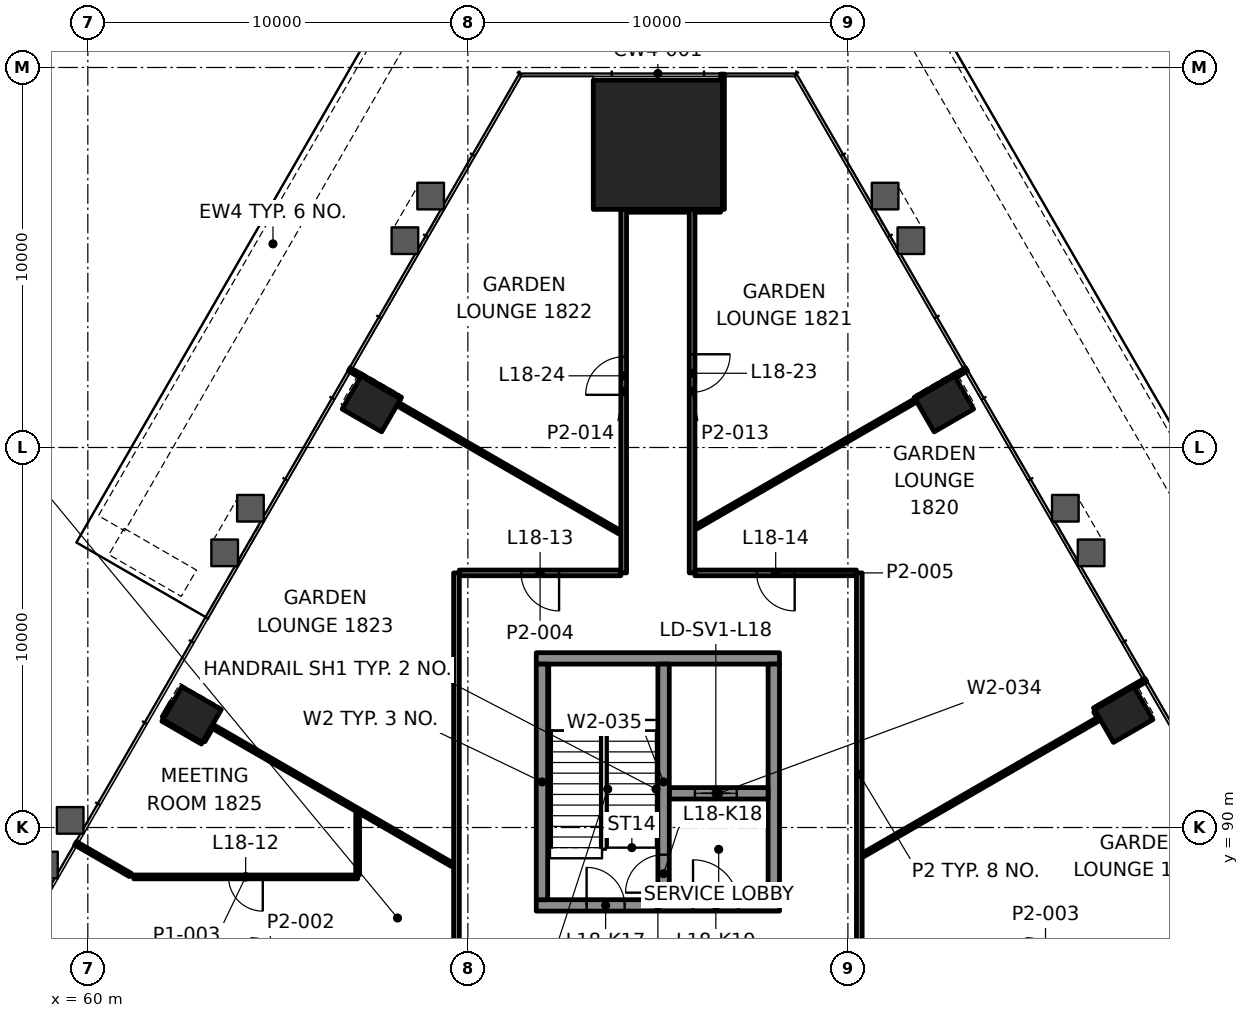
"""IFC4 building model, lengths in metres.
Left out: names, types, materials, properties, quantities, classifications, styles, units other than length and angle.
Written with IfcOpenShell. Run it as: python <this file> out.ifc"""

import sys

from ifc_helpers import new_model, si_unit, direction, frame, frame_2d, origin, origin_2d, place, context, subcontext, project, spatial, rectangle, extrude, element, fill, save


model = new_model("IFC4")
c1 = context("Model", 3, precision=1e-05, world=origin(), true_north=direction((0.0, 1.0)))
c2 = subcontext(c1, "Body", "Model", "MODEL_VIEW")
j1 = project(units=[si_unit("LENGTHUNIT", "METRE"), si_unit("PLANEANGLEUNIT", "RADIAN")], contexts=[c1])
p1 = place(None, origin())
s1 = spatial("IfcSite", under=j1, at=p1, CompositionType="ELEMENT")
p2 = place(p1, origin())
s2 = spatial("IfcBuilding", under=s1, at=p2, CompositionType="ELEMENT")
p3 = place(p2, frame((0.0, 0.0, 82.0)))
s3 = spatial("IfcBuildingStorey", under=s2, at=p3, CompositionType="ELEMENT", Elevation=82.0)
p4 = place(p3, frame((75.0, 107.966, 0.0), z_axis=(0.0, 0.0, 1.0), x_axis=(-1.0, 0.0, 0.0)))
e1 = element("IfcColumn", 1, at=p4, inside=s3, PredefinedType="COLUMN", context=c2, shape_type="SweptSolid", body=[
    extrude(rectangle(XDim=3.4, YDim=3.4, at=origin_2d()), origin(), (0.0, 0.0, 1.0), 4.2),
])
for number, where, z_axis, x_axis in (
    (2, (87.257, 92.972, -0.0), (0.0, 0.0, 1.0), (-0.5, 0.866, 0.0)),
    (3, (82.539, 101.144, -0.0), (0.0, 0.0, 1.0), (-0.5, 0.866, 0.0)),
    (4, (67.461, 101.144, -0.0), (0.0, 0.0, 1.0), (-0.5, -0.866, 0.0)),
    (5, (62.743, 92.972, -0.0), (0.0, 0.0, 1.0), (-0.5, -0.866, 0.0)),
):
    element("IfcColumn", number, at=place(p3, frame(where, z_axis=z_axis, x_axis=x_axis)), inside=s3, PredefinedType="COLUMN", context=c2, shape_type="SweptSolid", body=[
        extrude(rectangle(XDim=1.0, YDim=1.2, at=origin_2d()), origin(), (0.0, 0.0, 1.0), 4.2),
    ])
p5 = place(p3, frame((71.8, 87.95, 0.0), z_axis=(0.0, 0.0, 1.0), x_axis=(1.0, 0.0, 0.0)))
e6 = element("IfcWall", 6, at=p5, inside=s3, PredefinedType="SHEAR", context=c2, shape_type="SweptSolid", body=[
    extrude(rectangle(XDim=6.4, YDim=0.3, at=frame_2d((3.2, 0.0))), origin(), (0.0, 0.0, 1.0), 4.0),
])
p6 = place(p5, frame((1.325, 0.0, 0.0)))
e7 = element("IfcOpeningElement", 7, at=p6, cuts=e6, PredefinedType="OPENING", context=c2, shape_type="SweptSolid", body=[
    extrude(rectangle(XDim=1.0, YDim=2.1, at=frame_2d((0.5, 1.05))), frame((0.0, 0.16, 0.0), z_axis=(0.0, -1.0, 0.0), x_axis=(1.0, 0.0, 0.0)), (0.0, 0.0, 1.0), 0.32),
])
p7 = place(p5, frame((4.125, 0.0, 0.0)))
e8 = element("IfcOpeningElement", 8, at=p7, cuts=e6, PredefinedType="OPENING", context=c2, shape_type="SweptSolid", body=[
    extrude(rectangle(XDim=1.2, YDim=2.1, at=frame_2d((0.6, 1.05))), frame((0.0, 0.16, 0.0), z_axis=(0.0, -1.0, 0.0), x_axis=(1.0, 0.0, 0.0)), (0.0, 0.0, 1.0), 0.32),
])
p8 = place(p3, frame((71.8, 94.45, 0.0), z_axis=(0.0, 0.0, 1.0), x_axis=(1.0, 0.0, 0.0)))
e9 = element("IfcWall", 9, at=p8, inside=s3, PredefinedType="SHEAR", context=c2, shape_type="SweptSolid", body=[
    extrude(rectangle(XDim=6.4, YDim=0.3, at=frame_2d((3.2, 0.0))), origin(), (0.0, 0.0, 1.0), 4.0),
])
for number, where, z_axis, x_axis in (
    (10, (71.95, 88.1, 0.0), (0.0, 0.0, 1.0), (0.0, 1.0, 0.0)),
    (11, (78.05, 88.1, 0.0), (0.0, 0.0, 1.0), (0.0, 1.0, 0.0)),
):
    element("IfcWall", number, at=place(p3, frame(where, z_axis=z_axis, x_axis=x_axis)), inside=s3, PredefinedType="SHEAR", context=c2, shape_type="SweptSolid", body=[
        extrude(rectangle(XDim=6.2, YDim=0.3, at=frame_2d((3.1, 0.0))), origin(), (0.0, 0.0, 1.0), 4.0),
    ])
p9 = place(p3, frame((75.3, 90.9, 0.0), z_axis=(0.0, 0.0, 1.0), x_axis=(1.0, 0.0, 0.0)))
e12 = element("IfcWall", 12, at=p9, inside=s3, PredefinedType="SHEAR", context=c2, shape_type="SweptSolid", body=[
    extrude(rectangle(XDim=2.6, YDim=0.3, at=frame_2d((1.3, 0.0))), origin(), (0.0, 0.0, 1.0), 4.0),
])
p10 = place(p9, frame((0.675, 0.0, 0.0)))
e13 = element("IfcOpeningElement", 13, at=p10, cuts=e12, PredefinedType="OPENING", context=c2, shape_type="SweptSolid", body=[
    extrude(rectangle(XDim=1.1, YDim=2.1, at=frame_2d((0.55, 1.05))), frame((0.0, 0.16, 0.0), z_axis=(0.0, -1.0, 0.0), x_axis=(1.0, 0.0, 0.0)), (0.0, 0.0, 1.0), 0.32),
])
p11 = place(p3, frame((75.15, 88.1, 0.0), z_axis=(0.0, 0.0, 1.0), x_axis=(0.0, 1.0, 0.0)))
e14 = element("IfcWall", 14, at=p11, inside=s3, PredefinedType="SHEAR", context=c2, shape_type="SweptSolid", body=[
    extrude(rectangle(XDim=6.2, YDim=0.3, at=frame_2d((3.1, 0.0))), origin(), (0.0, 0.0, 1.0), 4.0),
])
p12 = place(p11, frame((0.185, 0.0, 0.0)))
e15 = element("IfcOpeningElement", 15, at=p12, cuts=e14, PredefinedType="OPENING", context=c2, shape_type="SweptSolid", body=[
    extrude(rectangle(XDim=1.0, YDim=2.1, at=frame_2d((0.5, 1.05))), frame((0.0, 0.16, 0.0), z_axis=(0.0, -1.0, 0.0), x_axis=(1.0, 0.0, 0.0)), (0.0, 0.0, 1.0), 0.32),
])
p13 = place(p3, frame((67.1, 88.7, 0.0), z_axis=(0.0, 0.0, 1.0), x_axis=(-1.0, 0.0, 0.0)))
e16 = element("IfcWall", 16, at=p13, inside=s3, PredefinedType="PARTITIONING", context=c2, shape_type="SweptSolid", body=[
    extrude(rectangle(XDim=5.893, YDim=0.1, at=frame_2d((2.947, 0.0))), origin(), (0.0, 0.0, 1.0), 3.4),
])
p14 = place(p13, frame((2.497, 0.0, 0.0)))
e17 = element("IfcOpeningElement", 17, at=p14, cuts=e16, PredefinedType="OPENING", context=c2, shape_type="SweptSolid", body=[
    extrude(rectangle(XDim=0.9, YDim=2.1, at=frame_2d((0.45, 1.05))), frame((0.0, 0.06, 0.0), z_axis=(0.0, -1.0, 0.0), x_axis=(1.0, 0.0, 0.0)), (0.0, 0.0, 1.0), 0.12),
])
p15 = place(p3, frame((74.025, 96.7, 0.0), z_axis=(0.0, 0.0, 1.0), x_axis=(-1.0, 0.0, 0.0)))
e18 = element("IfcWall", 18, at=p15, inside=s3, PredefinedType="PARTITIONING", context=c2, shape_type="SweptSolid", body=[
    extrude(rectangle(XDim=4.25, YDim=0.15, at=frame_2d((2.125, 0.0))), origin(), (0.0, 0.0, 1.0), 3.4),
])
p16 = place(p15, frame((1.625, 0.0, 0.0)))
e19 = element("IfcOpeningElement", 19, at=p16, cuts=e18, PredefinedType="OPENING", context=c2, shape_type="SweptSolid", body=[
    extrude(rectangle(XDim=1.0, YDim=2.1, at=frame_2d((0.5, 1.05))), frame((0.0, 0.085, 0.0), z_axis=(0.0, -1.0, 0.0), x_axis=(1.0, 0.0, 0.0)), (0.0, 0.0, 1.0), 0.17),
])
p17 = place(p3, frame((80.225, 96.7, 0.0), z_axis=(0.0, 0.0, 1.0), x_axis=(-1.0, 0.0, 0.0)))
e20 = element("IfcWall", 20, at=p17, inside=s3, PredefinedType="PARTITIONING", context=c2, shape_type="SweptSolid", body=[
    extrude(rectangle(XDim=4.25, YDim=0.15, at=frame_2d((2.125, 0.0))), origin(), (0.0, 0.0, 1.0), 3.4),
])
p18 = place(p17, frame((1.625, 0.0, 0.0)))
e21 = element("IfcOpeningElement", 21, at=p18, cuts=e20, PredefinedType="OPENING", context=c2, shape_type="SweptSolid", body=[
    extrude(rectangle(XDim=1.0, YDim=2.1, at=frame_2d((0.5, 1.05))), frame((0.0, 0.085, 0.0), z_axis=(0.0, -1.0, 0.0), x_axis=(1.0, 0.0, 0.0)), (0.0, 0.0, 1.0), 0.17),
])
p19 = place(p3, frame((74.176, 106.266, 0.0), z_axis=(0.0, 0.0, 1.0), x_axis=(1.0, 0.0, 0.0)))
e22 = element("IfcWall", 22, at=p19, inside=s3, PredefinedType="PARTITIONING", context=c2, shape_type="SweptSolid", body=[
    extrude(rectangle(XDim=1.649, YDim=0.15, at=frame_2d((0.825, 0.0))), origin(), (0.0, 0.0, 1.0), 3.397),
])
p20 = place(p3, frame((80.401, 89.28, 0.0), z_axis=(0.0, 0.0, 1.0), x_axis=(0.866017489163, 0.500013708276, 0.0)))
e23 = element("IfcWall", 23, at=p20, inside=s3, PredefinedType="PARTITIONING", context=c2, shape_type="SweptSolid", body=[
    extrude(rectangle(XDim=7.183, YDim=0.1, at=frame_2d((3.592, 0.0))), origin(), (0.0, 0.0, 1.0), 3.4),
])
p21 = place(p3, frame((86.488, 93.105, 0.0), z_axis=(0.0, 0.0, 1.0), x_axis=(0.866018739521, 0.500011542666, 0.0)))
e24 = element("IfcWall", 24, at=p21, inside=s3, PredefinedType="PARTITIONING", context=c2, shape_type="SweptSolid", body=[
    extrude(rectangle(XDim=1.56, YDim=0.1, at=frame_2d((0.78, 0.0))), origin(), (0.0, 0.0, 1.0), 3.165),
])
p22 = place(p3, frame((76.001, 97.901, 0.0), z_axis=(0.0, 0.0, 1.0), x_axis=(0.866029244915, 0.499993346908, 0.0)))
e25 = element("IfcWall", 25, at=p22, inside=s3, PredefinedType="PARTITIONING", context=c2, shape_type="SweptSolid", body=[
    extrude(rectangle(XDim=6.683, YDim=0.1, at=frame_2d((3.342, 0.0))), origin(), (0.0, 0.0, 1.0), 3.4),
])
p23 = place(p3, frame((81.769, 101.277, 0.0), z_axis=(0.0, 0.0, 1.0), x_axis=(0.866029224906, 0.499993381564, 0.0)))
e26 = element("IfcWall", 26, at=p23, inside=s3, PredefinedType="PARTITIONING", context=c2, shape_type="SweptSolid", body=[
    extrude(rectangle(XDim=1.56, YDim=0.1, at=frame_2d((0.78, 0.0))), origin(), (0.0, 0.0, 1.0), 3.4),
])
p24 = place(p3, frame((63.038, 92.283, 0.0), z_axis=(0.0, 0.0, 1.0), x_axis=(0.500246304613, 0.865883153041, 0.0)))
e27 = element("IfcWall", 27, at=p24, inside=s3, PredefinedType="PARTITIONING", context=c2, shape_type="SweptSolid", body=[
    extrude(rectangle(XDim=0.39, YDim=0.1, at=frame_2d((0.195, 0.0))), origin(), (0.0, 0.0, 1.0), 3.322),
])
p25 = place(p3, frame((62.002, 92.889, 0.0), z_axis=(0.0, 0.0, 1.0), x_axis=(0.4997542532, 0.866167239284, 0.0)))
e28 = element("IfcWall", 28, at=p25, inside=s3, PredefinedType="PARTITIONING", context=c2, shape_type="SweptSolid", body=[
    extrude(rectangle(XDim=0.443, YDim=0.1, at=frame_2d((0.222, 0.0))), origin(), (0.0, 0.0, 1.0), 3.322),
])
p26 = place(p3, frame((80.3, 86.1, 0.0), z_axis=(0.0, 0.0, 1.0), x_axis=(0.0, 1.0, 0.0)))
e29 = element("IfcWall", 29, at=p26, inside=s3, PredefinedType="PARTITIONING", context=c2, shape_type="SweptSolid", body=[
    extrude(rectangle(XDim=10.599, YDim=0.15, at=frame_2d((5.3, 0.0))), origin(), (0.0, 0.0, 1.0), 3.322),
])
p27 = place(p3, frame((76.7, 106.267, 0.0), z_axis=(0.0, 0.0, 1.0), x_axis=(0.0, 1.0, 0.0)))
e30 = element("IfcWall", 30, at=p27, inside=s3, PredefinedType="PARTITIONING", context=c2, shape_type="SweptSolid", body=[
    extrude(rectangle(XDim=3.56, YDim=0.1, at=frame_2d((1.78, 0.0))), origin(), (0.0, 0.0, 1.0), 3.4),
])
p28 = place(p3, frame((75.9, 106.266, 0.0), z_axis=(0.0, 0.0, 1.0), x_axis=(0.0, -1.0, 0.0)))
e31 = element("IfcWall", 31, at=p28, inside=s3, PredefinedType="PARTITIONING", context=c2, shape_type="SweptSolid", body=[
    extrude(rectangle(XDim=9.566, YDim=0.15, at=frame_2d((4.783, 0.0))), origin(), (0.0, 0.0, 1.0), 3.4),
])
p29 = place(p28, frame((3.813, 0.0, 0.0)))
e32 = element("IfcOpeningElement", 32, at=p29, cuts=e31, PredefinedType="OPENING", context=c2, shape_type="SweptSolid", body=[
    extrude(rectangle(XDim=1.0, YDim=2.1, at=frame_2d((0.5, 1.05))), frame((0.0, 0.085, 0.0), z_axis=(0.0, -1.0, 0.0), x_axis=(1.0, 0.0, 0.0)), (0.0, 0.0, 1.0), 0.17),
])
p30 = place(p3, frame((74.1, 96.7, 0.0), z_axis=(0.0, 0.0, 1.0), x_axis=(0.0, 1.0, 0.0)))
e33 = element("IfcWall", 33, at=p30, inside=s3, PredefinedType="PARTITIONING", context=c2, shape_type="SweptSolid", body=[
    extrude(rectangle(XDim=9.566, YDim=0.15, at=frame_2d((4.783, 0.0))), origin(), (0.0, 0.0, 1.0), 3.4),
])
p31 = place(p30, frame((4.686, 0.0, 0.0)))
e34 = element("IfcOpeningElement", 34, at=p31, cuts=e33, PredefinedType="OPENING", context=c2, shape_type="SweptSolid", body=[
    extrude(rectangle(XDim=1.0, YDim=2.1, at=frame_2d((0.5, 1.05))), frame((0.0, 0.085, 0.0), z_axis=(0.0, -1.0, 0.0), x_axis=(1.0, 0.0, 0.0)), (0.0, 0.0, 1.0), 0.17),
])
p32 = place(p3, frame((69.7, 86.1, 0.0), z_axis=(0.0, 0.0, 1.0), x_axis=(0.0, 1.0, 0.0)))
e35 = element("IfcWall", 35, at=p32, inside=s3, PredefinedType="PARTITIONING", context=c2, shape_type="SweptSolid", body=[
    extrude(rectangle(XDim=10.599, YDim=0.15, at=frame_2d((5.3, 0.0))), origin(), (0.0, 0.0, 1.0), 3.322),
])
p33 = place(p3, frame((67.1, 88.75, 0.0), z_axis=(0.0, 0.0, 1.0), x_axis=(0.0, 1.0, 0.0)))
e36 = element("IfcWall", 36, at=p33, inside=s3, PredefinedType="PARTITIONING", context=c2, shape_type="SweptSolid", body=[
    extrude(rectangle(XDim=1.619, YDim=0.1, at=frame_2d((0.81, 0.0))), origin(), (0.0, 0.0, 1.0), 3.322),
])
p34 = place(p3, frame((86.597, 92.915, 0.0), z_axis=(0.0, 0.0, 1.0), x_axis=(-0.500013496215, 0.866017611601, 0.0)))
e37 = element("IfcWall", 37, at=p34, inside=s3, PredefinedType="PARTITIONING", context=c2, shape_type="SweptSolid", body=[
    extrude(rectangle(XDim=0.169, YDim=0.1, at=frame_2d((0.085, 0.0))), origin(), (0.0, 0.0, 1.0), 3.4),
])
p35 = place(p3, frame((68.23, 101.277, 0.0), z_axis=(0.0, 0.0, 1.0), x_axis=(-0.866018739521, 0.500011542666, 0.0)))
e38 = element("IfcWall", 38, at=p35, inside=s3, PredefinedType="PARTITIONING", context=c2, shape_type="SweptSolid", body=[
    extrude(rectangle(XDim=1.56, YDim=0.1, at=frame_2d((0.78, 0.0))), origin(), (0.0, 0.0, 1.0), 3.4),
])
p36 = place(p3, frame((73.999, 97.768, 0.0), z_axis=(0.0, 0.0, 1.0), x_axis=(-0.866030773134, 0.499990699898, 0.0)))
e39 = element("IfcWall", 39, at=p36, inside=s3, PredefinedType="PARTITIONING", context=c2, shape_type="SweptSolid", body=[
    extrude(rectangle(XDim=6.749, YDim=0.1, at=frame_2d((3.375, 0.0))), origin(), (0.0, 0.0, 1.0), 3.4),
])
p37 = place(p3, frame((69.599, 89.014, 0.0), z_axis=(0.0, 0.0, 1.0), x_axis=(-0.866016649877, 0.500015161905, 0.0)))
e40 = element("IfcWall", 40, at=p37, inside=s3, PredefinedType="PARTITIONING", context=c2, shape_type="SweptSolid", body=[
    extrude(rectangle(XDim=7.316, YDim=0.1, at=frame_2d((3.658, 0.0))), origin(), (0.0, 0.0, 1.0), 3.322),
])
p38 = place(p3, frame((63.013, 92.239, 0.0), z_axis=(0.0, 0.0, 1.0), x_axis=(-0.866006032174, 0.500033551112, 0.0)))
e41 = element("IfcWall", 41, at=p38, inside=s3, PredefinedType="PARTITIONING", context=c2, shape_type="SweptSolid", body=[
    extrude(rectangle(XDim=1.2, YDim=0.1, at=frame_2d((0.6, 0.0))), origin(), (0.0, 0.0, 1.0), 3.165),
])
p39 = place(p3, frame((61.12, 88.75, 0.0), z_axis=(0.0, 0.0, 1.0), x_axis=(-0.865961000814, 0.50011153263, 0.0)))
e42 = element("IfcWall", 42, at=p39, inside=s3, PredefinedType="PARTITIONING", context=c2, shape_type="SweptSolid", body=[
    extrude(rectangle(XDim=1.666, YDim=0.1, at=frame_2d((0.833, 0.0))), origin(), (0.0, 0.0, 1.0), 3.165),
])
p40 = place(p3, frame((75.975, 106.266, 0.0), z_axis=(0.0, 0.0, 1.0), x_axis=(1.0, 0.0, 0.0)))
e43 = element("IfcWall", 43, at=p40, inside=s3, PredefinedType="PARTITIONING", context=c2, shape_type="SweptSolid", body=[
    extrude(rectangle(XDim=0.674, YDim=0.15, at=frame_2d((0.337, 0.0))), origin(), (0.0, 0.0, 1.0), 3.4),
])
p41 = place(p3, frame((110.601, 61.239, 0.0), z_axis=(0.0, 0.0, 1.0), x_axis=(-0.499998492585, 0.866026274089, 0.0)))
e44 = element("IfcWall", 44, at=p41, inside=s3, PredefinedType="SOLIDWALL", context=c2, shape_type="SweptSolid", body=[
    extrude(rectangle(XDim=59.436, YDim=0.8, at=frame_2d((29.718, 0.0))), origin(), (0.0, 0.0, 1.0), 0.9),
])
p42 = place(p3, frame((69.117, 112.712, 0.0), z_axis=(0.0, 0.0, 1.0), x_axis=(-0.499999969101, -0.866025421624, 0.0)))
e45 = element("IfcWall", 45, at=p42, inside=s3, PredefinedType="SOLIDWALL", context=c2, shape_type="SweptSolid", body=[
    extrude(rectangle(XDim=16.982, YDim=0.8, at=frame_2d((8.491, 0.0))), origin(), (0.0, 0.0, 1.0), 0.9),
])
p43 = place(p3, frame((60.754, 97.527, 0.0), z_axis=(0.0, 0.0, 1.0), x_axis=(0.866008176907, -0.50002983664, 0.0)))
e46 = element("IfcWall", 46, at=p43, inside=s3, PredefinedType="SOLIDWALL", context=c2, shape_type="SweptSolid", body=[
    extrude(rectangle(XDim=2.2, YDim=0.8, at=frame_2d((1.1, 0.0))), origin(), (0.0, 0.0, 1.0), 0.9),
])
p44 = place(p14, origin())
e47 = element("IfcDoor", 47, at=p44, inside=s3, OperationType="SINGLE_SWING_LEFT", PredefinedType="DOOR", context=c2, shape_type="SweptSolid", body=[
    extrude(rectangle(XDim=0.9, YDim=2.1, at=frame_2d((0.45, 1.05))), frame((0.0, 0.025, 0.0), z_axis=(0.0, -1.0, 0.0), x_axis=(1.0, 0.0, 0.0)), (0.0, 0.0, 1.0), 0.05),
])
fill(e17, e47)
p45 = place(p16, origin())
e48 = element("IfcDoor", 48, at=p45, inside=s3, OperationType="SINGLE_SWING_LEFT", PredefinedType="DOOR", context=c2, shape_type="SweptSolid", body=[
    extrude(rectangle(XDim=1.0, YDim=2.1, at=frame_2d((0.5, 1.05))), frame((0.0, 0.025, 0.0), z_axis=(0.0, -1.0, 0.0), x_axis=(1.0, 0.0, 0.0)), (0.0, 0.0, 1.0), 0.05),
])
fill(e19, e48)
p46 = place(p18, origin())
e49 = element("IfcDoor", 49, at=p46, inside=s3, OperationType="SINGLE_SWING_RIGHT", PredefinedType="DOOR", context=c2, shape_type="SweptSolid", body=[
    extrude(rectangle(XDim=1.0, YDim=2.1, at=frame_2d((0.5, 1.05))), frame((0.0, 0.025, 0.0), z_axis=(0.0, -1.0, 0.0), x_axis=(1.0, 0.0, 0.0)), (0.0, 0.0, 1.0), 0.05),
])
fill(e21, e49)
p47 = place(p29, origin())
e50 = element("IfcDoor", 50, at=p47, inside=s3, OperationType="SINGLE_SWING_LEFT", PredefinedType="DOOR", context=c2, shape_type="SweptSolid", body=[
    extrude(rectangle(XDim=1.0, YDim=2.1, at=frame_2d((0.5, 1.05))), frame((0.0, 0.025, 0.0), z_axis=(0.0, -1.0, 0.0), x_axis=(1.0, 0.0, 0.0)), (0.0, 0.0, 1.0), 0.05),
])
fill(e32, e50)
p48 = place(p31, origin())
e51 = element("IfcDoor", 51, at=p48, inside=s3, OperationType="SINGLE_SWING_LEFT", PredefinedType="DOOR", context=c2, shape_type="SweptSolid", body=[
    extrude(rectangle(XDim=1.0, YDim=2.1, at=frame_2d((0.5, 1.05))), frame((0.0, 0.025, 0.0), z_axis=(0.0, -1.0, 0.0), x_axis=(1.0, 0.0, 0.0)), (0.0, 0.0, 1.0), 0.05),
])
fill(e34, e51)
p49 = place(p10, origin())
e52 = element("IfcDoor", 52, at=p49, inside=s3, OperationType="DOUBLE_DOOR_SLIDING", PredefinedType="DOOR", context=c2, shape_type="SweptSolid", body=[
    extrude(rectangle(XDim=1.1, YDim=2.1, at=frame_2d((0.55, 1.05))), frame((0.0, 0.025, 0.0), z_axis=(0.0, -1.0, 0.0), x_axis=(1.0, 0.0, 0.0)), (0.0, 0.0, 1.0), 0.05),
])
fill(e13, e52)
p50 = place(p6, origin())
e53 = element("IfcDoor", 53, at=p50, inside=s3, OperationType="SINGLE_SWING_RIGHT", PredefinedType="DOOR", context=c2, shape_type="SweptSolid", body=[
    extrude(rectangle(XDim=1.0, YDim=2.1, at=frame_2d((0.5, 1.05))), frame((0.0, 0.025, 0.0), z_axis=(0.0, -1.0, 0.0), x_axis=(1.0, 0.0, 0.0)), (0.0, 0.0, 1.0), 0.05),
])
fill(e7, e53)
p51 = place(p12, origin())
e54 = element("IfcDoor", 54, at=p51, inside=s3, OperationType="SINGLE_SWING_LEFT", PredefinedType="DOOR", context=c2, shape_type="SweptSolid", body=[
    extrude(rectangle(XDim=1.0, YDim=2.1, at=frame_2d((0.5, 1.05))), frame((0.0, 0.025, 0.0), z_axis=(0.0, -1.0, 0.0), x_axis=(1.0, 0.0, 0.0)), (0.0, 0.0, 1.0), 0.05),
])
fill(e15, e54)
p52 = place(p7, origin())
e55 = element("IfcDoor", 55, at=p52, inside=s3, OperationType="SINGLE_SWING_RIGHT", PredefinedType="DOOR", context=c2, shape_type="SweptSolid", body=[
    extrude(rectangle(XDim=1.2, YDim=2.1, at=frame_2d((0.6, 1.05))), frame((0.0, 0.025, 0.0), z_axis=(0.0, -1.0, 0.0), x_axis=(1.0, 0.0, 0.0)), (0.0, 0.0, 1.0), 0.05),
])
fill(e8, e55)
save(model, sys.argv[1])
